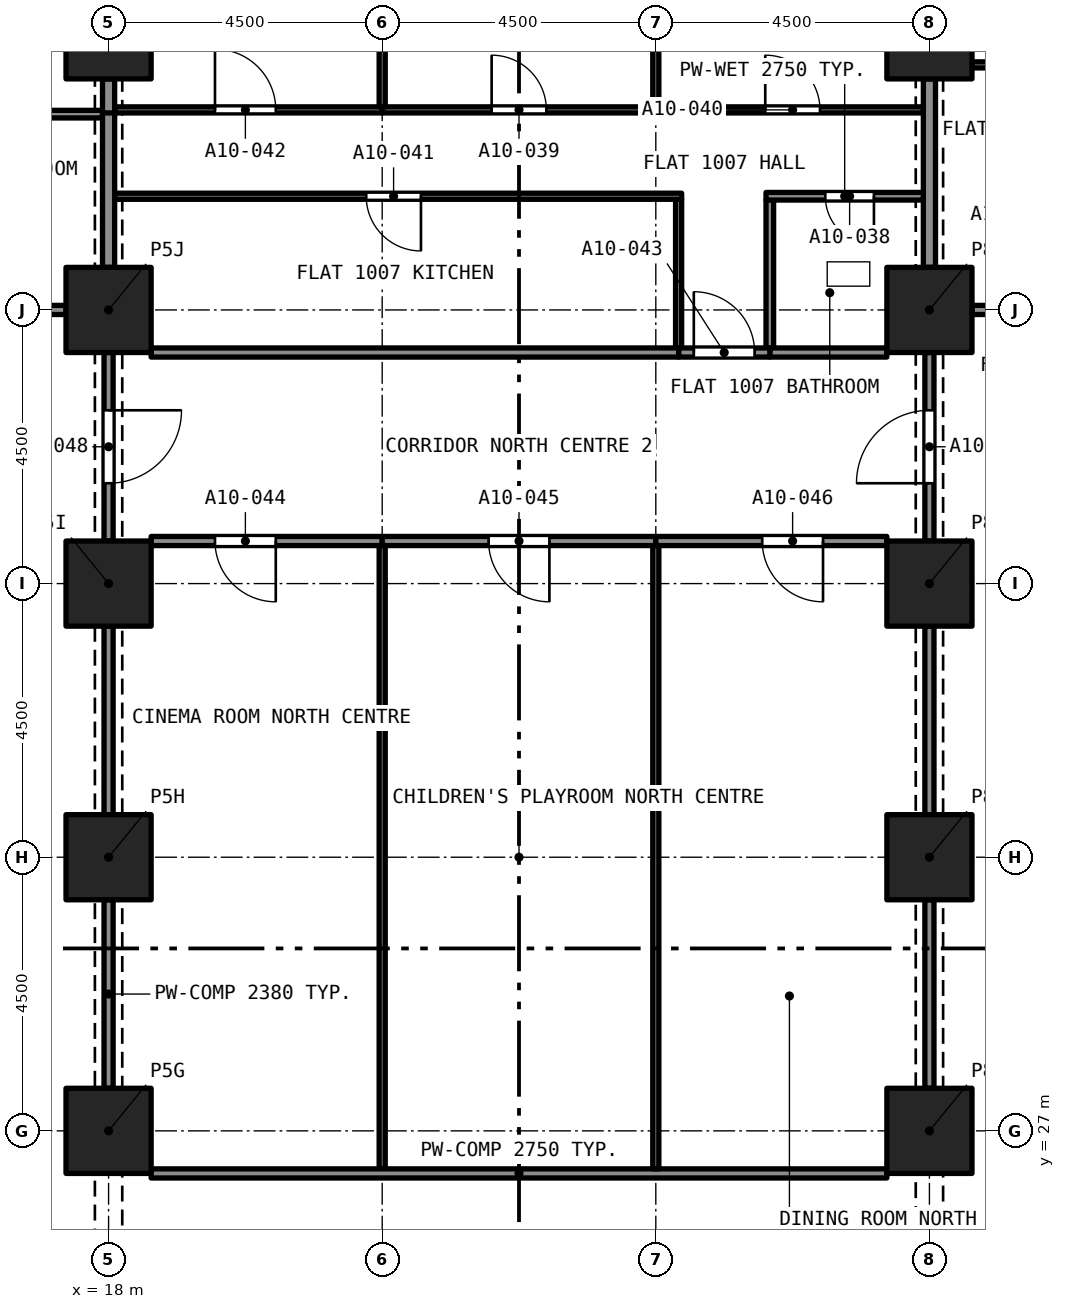
"""IFC4 building model, lengths in metres.
Left out: names, types, materials, properties, quantities, classifications, styles, units other than length and angle.
Written with IfcOpenShell. Run it as: python <this file> out.ifc"""

import sys

from ifc_helpers import new_model, si_unit, direction, frame, frame_2d, origin, origin_2d, place, context, subcontext, project, spatial, rectangle, extrude, element, fill, save


model = new_model("IFC4")
c1 = context("Model", 3, precision=1e-05, world=origin(), true_north=direction((0.0, 1.0)))
c2 = subcontext(c1, "Body", "Model", "MODEL_VIEW")
j1 = project(units=[si_unit("LENGTHUNIT", "METRE"), si_unit("PLANEANGLEUNIT", "RADIAN")], contexts=[c1])
p1 = place(None, origin())
s1 = spatial("IfcSite", under=j1, at=p1, CompositionType="ELEMENT")
p2 = place(p1, origin())
s2 = spatial("IfcBuilding", under=s1, at=p2, CompositionType="ELEMENT")
p3 = place(p2, frame((0.0, 0.0, 43.2)))
s3 = spatial("IfcBuildingStorey", under=s2, at=p3, CompositionType="ELEMENT", Elevation=43.2)
for number, where, z_axis, x_axis in (
    (1, (18.0, 27.0, 0.0), (0.0, 0.0, 1.0), (1.0, 0.0, 0.0)),
    (2, (31.5, 27.0, 0.0), (0.0, 0.0, 1.0), (1.0, 0.0, 0.0)),
    (3, (18.0, 31.5, 0.0), (0.0, 0.0, 1.0), (1.0, 0.0, 0.0)),
    (4, (31.5, 31.5, 0.0), (0.0, 0.0, 1.0), (1.0, 0.0, 0.0)),
    (5, (18.0, 36.0, 0.0), (0.0, 0.0, 1.0), (1.0, 0.0, 0.0)),
    (6, (31.5, 36.0, 0.0), (0.0, 0.0, 1.0), (1.0, 0.0, 0.0)),
    (7, (18.0, 40.5, 0.0), (0.0, 0.0, 1.0), (1.0, 0.0, 0.0)),
    (8, (31.5, 40.5, 0.0), (0.0, 0.0, 1.0), (1.0, 0.0, 0.0)),
    (9, (18.0, 45.0, 0.0), (0.0, 0.0, 1.0), (1.0, 0.0, 0.0)),
    (10, (31.5, 45.0, 0.0), (0.0, 0.0, 1.0), (1.0, 0.0, 0.0)),
):
    element("IfcColumn", number, at=place(p3, frame(where, z_axis=z_axis, x_axis=x_axis)), inside=s3, PredefinedType="COLUMN", context=c2, shape_type="SweptSolid", body=[
        extrude(rectangle(XDim=1.4, YDim=1.4, at=origin_2d()), origin(), (0.0, 0.0, 1.0), 3.2),
    ])
p4 = place(p3, frame((17.9, 43.72, 0.0), z_axis=(0.0, 0.0, 1.0), x_axis=(-1.0, 0.0, 0.0)))
e11 = element("IfcWall", 11, at=p4, inside=s3, PredefinedType="PARTITIONING", context=c2, shape_type="SweptSolid", body=[
    extrude(rectangle(XDim=4.327, YDim=0.125, at=frame_2d((2.163, 0.0))), origin(), (0.0, 0.0, 1.0), 2.9),
])
p5 = place(p4, frame((1.713, 0.0, 0.0)))
e12 = element("IfcOpeningElement", 12, at=p5, cuts=e11, PredefinedType="OPENING", context=c2, shape_type="SweptSolid", body=[
    extrude(rectangle(XDim=0.8, YDim=2.1, at=frame_2d((0.4, 1.05))), frame((0.0, 0.073, 0.0), z_axis=(0.0, -1.0, 0.0), x_axis=(1.0, 0.0, 0.0)), (0.0, 0.0, 1.0), 0.145),
])
p6 = place(p3, frame((18.0, 41.2, 0.0), z_axis=(0.0, 0.0, 1.0), x_axis=(0.0, 1.0, 0.0)))
e13 = element("IfcWall", 13, at=p6, inside=s3, PredefinedType="PARTITIONING", context=c2, shape_type="SweptSolid", body=[
    extrude(rectangle(XDim=2.583, YDim=0.2, at=frame_2d((1.291, 0.0))), origin(), (0.0, 0.0, 1.0), 2.38),
])
p7 = place(p3, frame((13.511, 40.5, 0.0), z_axis=(0.0, 0.0, 1.0), x_axis=(1.0, 0.0, 0.0)))
e14 = element("IfcWall", 14, at=p7, inside=s3, PredefinedType="PARTITIONING", context=c2, shape_type="SweptSolid", body=[
    extrude(rectangle(XDim=3.789, YDim=0.15, at=frame_2d((1.895, 0.0))), origin(), (0.0, 0.0, 1.0), 2.9),
])
p8 = place(p3, frame((18.0, 43.74, 0.0), z_axis=(0.0, 0.0, 1.0), x_axis=(0.0, 1.0, 0.0)))
e15 = element("IfcWall", 15, at=p8, inside=s3, PredefinedType="PARTITIONING", context=c2, shape_type="SweptSolid", body=[
    extrude(rectangle(XDim=0.56, YDim=0.2, at=frame_2d((0.28, 0.0))), origin(), (0.0, 0.0, 1.0), 2.38),
])
p9 = place(p3, frame((32.2, 44.53, 0.0), z_axis=(0.0, 0.0, 1.0), x_axis=(1.0, 0.0, 0.0)))
e16 = element("IfcWall", 16, at=p9, inside=s3, PredefinedType="PARTITIONING", context=c2, shape_type="SweptSolid", body=[
    extrude(rectangle(XDim=3.8, YDim=0.1, at=frame_2d((1.9, 0.0))), origin(), (0.0, 0.0, 1.0), 2.9),
])
p10 = place(p9, frame((1.05, 0.0, 0.0)))
e17 = element("IfcOpeningElement", 17, at=p10, cuts=e16, PredefinedType="OPENING", context=c2, shape_type="SweptSolid", body=[
    extrude(rectangle(XDim=1.0, YDim=2.1, at=frame_2d((0.5, 1.05))), frame((0.0, 0.06, 0.0), z_axis=(0.0, -1.0, 0.0), x_axis=(1.0, 0.0, 0.0)), (0.0, 0.0, 1.0), 0.12),
])
p11 = place(p3, frame((31.5, 41.2, 0.0), z_axis=(0.0, 0.0, 1.0), x_axis=(0.0, 1.0, 0.0)))
e18 = element("IfcWall", 18, at=p11, inside=s3, PredefinedType="PARTITIONING", context=c2, shape_type="SweptSolid", body=[
    extrude(rectangle(XDim=3.1, YDim=0.2, at=frame_2d((1.55, 0.0))), origin(), (0.0, 0.0, 1.0), 2.38),
])
p12 = place(p3, frame((32.2, 40.5, 0.0), z_axis=(0.0, 0.0, 1.0), x_axis=(1.0, 0.0, 0.0)))
e19 = element("IfcWall", 19, at=p12, inside=s3, PredefinedType="PARTITIONING", context=c2, shape_type="SweptSolid", body=[
    extrude(rectangle(XDim=2.3, YDim=0.15, at=frame_2d((1.15, 0.0))), origin(), (0.0, 0.0, 1.0), 2.9),
])
p13 = place(p12, frame((1.05, 0.0, 0.0)))
e20 = element("IfcOpeningElement", 20, at=p13, cuts=e19, PredefinedType="OPENING", context=c2, shape_type="SweptSolid", body=[
    extrude(rectangle(XDim=1.0, YDim=2.1, at=frame_2d((0.5, 1.05))), frame((0.0, 0.085, 0.0), z_axis=(0.0, -1.0, 0.0), x_axis=(1.0, 0.0, 0.0)), (0.0, 0.0, 1.0), 0.17),
])
p14 = place(p3, frame((28.875, 39.875, 0.0), z_axis=(0.0, 0.0, 1.0), x_axis=(0.0, 1.0, 0.0)))
e21 = element("IfcWall", 21, at=p14, inside=s3, PredefinedType="PARTITIONING", context=c2, shape_type="SweptSolid", body=[
    extrude(rectangle(XDim=2.433, YDim=0.125, at=frame_2d((1.216, 0.0))), origin(), (0.0, 0.0, 1.0), 2.75),
])
p15 = place(p3, frame((31.4, 42.37, 0.0), z_axis=(0.0, 0.0, 1.0), x_axis=(-1.0, 0.0, 0.0)))
e22 = element("IfcWall", 22, at=p15, inside=s3, PredefinedType="PARTITIONING", context=c2, shape_type="SweptSolid", body=[
    extrude(rectangle(XDim=2.587, YDim=0.125, at=frame_2d((1.294, 0.0))), origin(), (0.0, 0.0, 1.0), 2.75),
])
p16 = place(p15, frame((0.812, 0.0, 0.0)))
e23 = element("IfcOpeningElement", 23, at=p16, cuts=e22, PredefinedType="OPENING", context=c2, shape_type="SweptSolid", body=[
    extrude(rectangle(XDim=0.8, YDim=2.1, at=frame_2d((0.4, 1.05))), frame((0.0, 0.073, 0.0), z_axis=(0.0, -1.0, 0.0), x_axis=(1.0, 0.0, 0.0)), (0.0, 0.0, 1.0), 0.145),
])
p17 = place(p3, frame((28.875, 39.8, 0.0), z_axis=(0.0, 0.0, 1.0), x_axis=(1.0, 0.0, 0.0)))
e24 = element("IfcWall", 24, at=p17, inside=s3, PredefinedType="PARTITIONING", context=c2, shape_type="SweptSolid", body=[
    extrude(rectangle(XDim=1.925, YDim=0.15, at=frame_2d((0.962, 0.0))), origin(), (0.0, 0.0, 1.0), 2.75),
])
p18 = place(p3, frame((27.0, 43.84, 0.0), z_axis=(0.0, 0.0, 1.0), x_axis=(0.0, 1.0, 0.0)))
e25 = element("IfcWall", 25, at=p18, inside=s3, PredefinedType="PARTITIONING", context=c2, shape_type="SweptSolid", body=[
    extrude(rectangle(XDim=4.96, YDim=0.1, at=frame_2d((2.48, 0.0))), origin(), (0.0, 0.0, 1.0), 2.75),
])
p19 = place(p3, frame((22.5, 43.79, 0.0), z_axis=(0.0, 0.0, 1.0), x_axis=(1.0, 0.0, 0.0)))
e26 = element("IfcWall", 26, at=p19, inside=s3, PredefinedType="PARTITIONING", context=c2, shape_type="SweptSolid", body=[
    extrude(rectangle(XDim=4.5, YDim=0.1, at=frame_2d((2.25, 0.0))), origin(), (0.0, 0.0, 1.0), 2.75),
])
p20 = place(p19, frame((1.8, 0.0, 0.0)))
e27 = element("IfcOpeningElement", 27, at=p20, cuts=e26, PredefinedType="OPENING", context=c2, shape_type="SweptSolid", body=[
    extrude(rectangle(XDim=0.9, YDim=2.1, at=frame_2d((0.45, 1.05))), frame((0.0, 0.06, 0.0), z_axis=(0.0, -1.0, 0.0), x_axis=(1.0, 0.0, 0.0)), (0.0, 0.0, 1.0), 0.12),
])
p21 = place(p3, frame((22.5, 43.84, 0.0), z_axis=(0.0, 0.0, 1.0), x_axis=(0.0, 1.0, 0.0)))
e28 = element("IfcWall", 28, at=p21, inside=s3, PredefinedType="PARTITIONING", context=c2, shape_type="SweptSolid", body=[
    extrude(rectangle(XDim=4.96, YDim=0.1, at=frame_2d((2.48, 0.0))), origin(), (0.0, 0.0, 1.0), 2.75),
])
p22 = place(p3, frame((27.0, 43.79, 0.0), z_axis=(0.0, 0.0, 1.0), x_axis=(1.0, 0.0, 0.0)))
e29 = element("IfcWall", 29, at=p22, inside=s3, PredefinedType="PARTITIONING", context=c2, shape_type="SweptSolid", body=[
    extrude(rectangle(XDim=4.4, YDim=0.1, at=frame_2d((2.2, 0.0))), origin(), (0.0, 0.0, 1.0), 2.75),
])
p23 = place(p22, frame((1.8, 0.0, 0.0)))
e30 = element("IfcOpeningElement", 30, at=p23, cuts=e29, PredefinedType="OPENING", context=c2, shape_type="SweptSolid", body=[
    extrude(rectangle(XDim=0.9, YDim=2.1, at=frame_2d((0.45, 1.05))), frame((0.0, 0.06, 0.0), z_axis=(0.0, -1.0, 0.0), x_axis=(1.0, 0.0, 0.0)), (0.0, 0.0, 1.0), 0.12),
])
p24 = place(p3, frame((27.375, 39.875, 0.0), z_axis=(0.0, 0.0, 1.0), x_axis=(0.0, 1.0, 0.0)))
e31 = element("IfcWall", 31, at=p24, inside=s3, PredefinedType="PARTITIONING", context=c2, shape_type="SweptSolid", body=[
    extrude(rectangle(XDim=2.445, YDim=0.1, at=frame_2d((1.223, 0.0))), origin(), (0.0, 0.0, 1.0), 2.75),
])
p25 = place(p3, frame((27.425, 42.37, 0.0), z_axis=(0.0, 0.0, 1.0), x_axis=(-1.0, 0.0, 0.0)))
e32 = element("IfcWall", 32, at=p25, inside=s3, PredefinedType="PARTITIONING", context=c2, shape_type="SweptSolid", body=[
    extrude(rectangle(XDim=9.325, YDim=0.1, at=frame_2d((4.663, 0.0))), origin(), (0.0, 0.0, 1.0), 2.75),
])
p26 = place(p25, frame((4.288, 0.0, 0.0)))
e33 = element("IfcOpeningElement", 33, at=p26, cuts=e32, PredefinedType="OPENING", context=c2, shape_type="SweptSolid", body=[
    extrude(rectangle(XDim=0.9, YDim=2.1, at=frame_2d((0.45, 1.05))), frame((0.0, 0.06, 0.0), z_axis=(0.0, -1.0, 0.0), x_axis=(1.0, 0.0, 0.0)), (0.0, 0.0, 1.0), 0.12),
])
p27 = place(p3, frame((18.1, 43.79, 0.0), z_axis=(0.0, 0.0, 1.0), x_axis=(1.0, 0.0, 0.0)))
e34 = element("IfcWall", 34, at=p27, inside=s3, PredefinedType="PARTITIONING", context=c2, shape_type="SweptSolid", body=[
    extrude(rectangle(XDim=4.4, YDim=0.1, at=frame_2d((2.2, 0.0))), origin(), (0.0, 0.0, 1.0), 2.75),
])
p28 = place(p27, frame((1.65, 0.0, 0.0)))
e35 = element("IfcOpeningElement", 35, at=p28, cuts=e34, PredefinedType="OPENING", context=c2, shape_type="SweptSolid", body=[
    extrude(rectangle(XDim=1.0, YDim=2.1, at=frame_2d((0.5, 1.05))), frame((0.0, 0.06, 0.0), z_axis=(0.0, -1.0, 0.0), x_axis=(1.0, 0.0, 0.0)), (0.0, 0.0, 1.0), 0.12),
])
p29 = place(p3, frame((27.375, 39.8, 0.0), z_axis=(0.0, 0.0, 1.0), x_axis=(1.0, 0.0, 0.0)))
e36 = element("IfcWall", 36, at=p29, inside=s3, PredefinedType="PARTITIONING", context=c2, shape_type="SweptSolid", body=[
    extrude(rectangle(XDim=1.5, YDim=0.15, at=frame_2d((0.75, 0.0))), origin(), (0.0, 0.0, 1.0), 2.75),
])
p30 = place(p29, frame((0.25, 0.0, 0.0)))
e37 = element("IfcOpeningElement", 37, at=p30, cuts=e36, PredefinedType="OPENING", context=c2, shape_type="SweptSolid", body=[
    extrude(rectangle(XDim=1.0, YDim=2.1, at=frame_2d((0.5, 1.05))), frame((0.0, 0.085, 0.0), z_axis=(0.0, -1.0, 0.0), x_axis=(1.0, 0.0, 0.0)), (0.0, 0.0, 1.0), 0.17),
])
p31 = place(p3, frame((18.7, 39.8, 0.0), z_axis=(0.0, 0.0, 1.0), x_axis=(1.0, 0.0, 0.0)))
e38 = element("IfcWall", 38, at=p31, inside=s3, PredefinedType="PARTITIONING", context=c2, shape_type="SweptSolid", body=[
    extrude(rectangle(XDim=8.675, YDim=0.15, at=frame_2d((4.337, 0.0))), origin(), (0.0, 0.0, 1.0), 2.75),
])
p32 = place(p3, frame((22.5, 36.7, 0.0), z_axis=(0.0, 0.0, 1.0), x_axis=(-1.0, 0.0, 0.0)))
e39 = element("IfcWall", 39, at=p32, inside=s3, PredefinedType="PARTITIONING", context=c2, shape_type="SweptSolid", body=[
    extrude(rectangle(XDim=3.8, YDim=0.15, at=frame_2d((1.9, 0.0))), origin(), (0.0, 0.0, 1.0), 2.75),
])
p33 = place(p32, frame((1.75, 0.0, 0.0)))
e40 = element("IfcOpeningElement", 40, at=p33, cuts=e39, PredefinedType="OPENING", context=c2, shape_type="SweptSolid", body=[
    extrude(rectangle(XDim=1.0, YDim=2.1, at=frame_2d((0.5, 1.05))), frame((0.0, 0.085, 0.0), z_axis=(0.0, -1.0, 0.0), x_axis=(1.0, 0.0, 0.0)), (0.0, 0.0, 1.0), 0.17),
])
p34 = place(p3, frame((27.0, 36.7, 0.0), z_axis=(0.0, 0.0, 1.0), x_axis=(-1.0, 0.0, 0.0)))
e41 = element("IfcWall", 41, at=p34, inside=s3, PredefinedType="PARTITIONING", context=c2, shape_type="SweptSolid", body=[
    extrude(rectangle(XDim=4.5, YDim=0.15, at=frame_2d((2.25, 0.0))), origin(), (0.0, 0.0, 1.0), 2.75),
])
p35 = place(p34, frame((1.75, 0.0, 0.0)))
e42 = element("IfcOpeningElement", 42, at=p35, cuts=e41, PredefinedType="OPENING", context=c2, shape_type="SweptSolid", body=[
    extrude(rectangle(XDim=1.0, YDim=2.1, at=frame_2d((0.5, 1.05))), frame((0.0, 0.085, 0.0), z_axis=(0.0, -1.0, 0.0), x_axis=(1.0, 0.0, 0.0)), (0.0, 0.0, 1.0), 0.17),
])
p36 = place(p3, frame((30.8, 36.7, 0.0), z_axis=(0.0, 0.0, 1.0), x_axis=(-1.0, 0.0, 0.0)))
e43 = element("IfcWall", 43, at=p36, inside=s3, PredefinedType="PARTITIONING", context=c2, shape_type="SweptSolid", body=[
    extrude(rectangle(XDim=3.8, YDim=0.15, at=frame_2d((1.9, 0.0))), origin(), (0.0, 0.0, 1.0), 2.75),
])
p37 = place(p36, frame((1.05, 0.0, 0.0)))
e44 = element("IfcOpeningElement", 44, at=p37, cuts=e43, PredefinedType="OPENING", context=c2, shape_type="SweptSolid", body=[
    extrude(rectangle(XDim=1.0, YDim=2.1, at=frame_2d((0.5, 1.05))), frame((0.0, 0.085, 0.0), z_axis=(0.0, -1.0, 0.0), x_axis=(1.0, 0.0, 0.0)), (0.0, 0.0, 1.0), 0.17),
])
p38 = place(p3, frame((31.5, 36.7, 0.0), z_axis=(0.0, 0.0, 1.0), x_axis=(0.0, 1.0, 0.0)))
e45 = element("IfcWall", 45, at=p38, inside=s3, PredefinedType="PARTITIONING", context=c2, shape_type="SweptSolid", body=[
    extrude(rectangle(XDim=3.1, YDim=0.15, at=frame_2d((1.55, 0.0))), origin(), (0.0, 0.0, 1.0), 2.38),
])
p39 = place(p38, frame((0.95, 0.0, 0.0)))
e46 = element("IfcOpeningElement", 46, at=p39, cuts=e45, PredefinedType="OPENING", context=c2, shape_type="SweptSolid", body=[
    extrude(rectangle(XDim=1.2, YDim=2.1, at=frame_2d((0.6, 1.05))), frame((0.0, 0.085, 0.0), z_axis=(0.0, -1.0, 0.0), x_axis=(1.0, 0.0, 0.0)), (0.0, 0.0, 1.0), 0.17),
])
p40 = place(p3, frame((18.0, 39.8, 0.0), z_axis=(0.0, 0.0, 1.0), x_axis=(0.0, -1.0, 0.0)))
e47 = element("IfcWall", 47, at=p40, inside=s3, PredefinedType="PARTITIONING", context=c2, shape_type="SweptSolid", body=[
    extrude(rectangle(XDim=3.1, YDim=0.15, at=frame_2d((1.55, 0.0))), origin(), (0.0, 0.0, 1.0), 2.38),
])
p41 = place(p40, frame((0.95, 0.0, 0.0)))
e48 = element("IfcOpeningElement", 48, at=p41, cuts=e47, PredefinedType="OPENING", context=c2, shape_type="SweptSolid", body=[
    extrude(rectangle(XDim=1.2, YDim=2.1, at=frame_2d((0.6, 1.05))), frame((0.0, 0.085, 0.0), z_axis=(0.0, -1.0, 0.0), x_axis=(1.0, 0.0, 0.0)), (0.0, 0.0, 1.0), 0.17),
])
p42 = place(p3, frame((22.5, 26.375, 0.0), z_axis=(0.0, 0.0, 1.0), x_axis=(0.0, 1.0, 0.0)))
e49 = element("IfcWall", 49, at=p42, inside=s3, PredefinedType="PARTITIONING", context=c2, shape_type="SweptSolid", body=[
    extrude(rectangle(XDim=10.25, YDim=0.1, at=frame_2d((5.125, 0.0))), origin(), (0.0, 0.0, 1.0), 2.75),
])
for number, where, z_axis, x_axis in (
    (50, (18.0, 27.7, 0.0), (0.0, 0.0, 1.0), (0.0, 1.0, 0.0)),
    (51, (18.0, 32.2, 0.0), (0.0, 0.0, 1.0), (0.0, 1.0, 0.0)),
):
    element("IfcWall", number, at=place(p3, frame(where, z_axis=z_axis, x_axis=x_axis)), inside=s3, PredefinedType="PARTITIONING", context=c2, shape_type="SweptSolid", body=[
        extrude(rectangle(XDim=3.1, YDim=0.15, at=frame_2d((1.55, 0.0))), origin(), (0.0, 0.0, 1.0), 2.38),
    ])
p43 = place(p3, frame((18.7, 26.3, 0.0), z_axis=(0.0, 0.0, 1.0), x_axis=(1.0, 0.0, 0.0)))
e52 = element("IfcWall", 52, at=p43, inside=s3, PredefinedType="PARTITIONING", context=c2, shape_type="SweptSolid", body=[
    extrude(rectangle(XDim=12.1, YDim=0.15, at=frame_2d((6.05, 0.0))), origin(), (0.0, 0.0, 1.0), 2.75),
])
p44 = place(p3, frame((27.0, 26.375, 0.0), z_axis=(0.0, 0.0, 1.0), x_axis=(0.0, 1.0, 0.0)))
e53 = element("IfcWall", 53, at=p44, inside=s3, PredefinedType="PARTITIONING", context=c2, shape_type="SweptSolid", body=[
    extrude(rectangle(XDim=10.25, YDim=0.1, at=frame_2d((5.125, 0.0))), origin(), (0.0, 0.0, 1.0), 2.75),
])
for number, where, z_axis, x_axis in (
    (54, (31.5, 32.2, 0.0), (0.0, 0.0, 1.0), (0.0, 1.0, 0.0)),
    (55, (31.5, 27.7, 0.0), (0.0, 0.0, 1.0), (0.0, 1.0, 0.0)),
):
    element("IfcWall", number, at=place(p3, frame(where, z_axis=z_axis, x_axis=x_axis)), inside=s3, PredefinedType="PARTITIONING", context=c2, shape_type="SweptSolid", body=[
        extrude(rectangle(XDim=3.1, YDim=0.15, at=frame_2d((1.55, 0.0))), origin(), (0.0, 0.0, 1.0), 2.38),
    ])
p45 = place(p16, origin())
e56 = element("IfcDoor", 56, at=p45, inside=s3, OperationType="SINGLE_SWING_LEFT", PredefinedType="DOOR", context=c2, shape_type="SweptSolid", body=[
    extrude(rectangle(XDim=0.8, YDim=2.1, at=frame_2d((0.4, 1.05))), frame((0.0, 0.025, 0.0), z_axis=(0.0, -1.0, 0.0), x_axis=(1.0, 0.0, 0.0)), (0.0, 0.0, 1.0), 0.05),
])
fill(e23, e56)
p46 = place(p20, origin())
e57 = element("IfcDoor", 57, at=p46, inside=s3, OperationType="SINGLE_SWING_LEFT", PredefinedType="DOOR", context=c2, shape_type="SweptSolid", body=[
    extrude(rectangle(XDim=0.9, YDim=2.1, at=frame_2d((0.45, 1.05))), frame((0.0, 0.025, 0.0), z_axis=(0.0, -1.0, 0.0), x_axis=(1.0, 0.0, 0.0)), (0.0, 0.0, 1.0), 0.05),
])
fill(e27, e57)
p47 = place(p23, origin())
e58 = element("IfcDoor", 58, at=p47, inside=s3, OperationType="SINGLE_SWING_RIGHT", PredefinedType="DOOR", context=c2, shape_type="SweptSolid", body=[
    extrude(rectangle(XDim=0.9, YDim=2.1, at=frame_2d((0.45, 1.05))), frame((0.0, 0.025, 0.0), z_axis=(0.0, -1.0, 0.0), x_axis=(1.0, 0.0, 0.0)), (0.0, 0.0, 1.0), 0.05),
])
fill(e30, e58)
p48 = place(p26, origin())
e59 = element("IfcDoor", 59, at=p48, inside=s3, OperationType="SINGLE_SWING_RIGHT", PredefinedType="DOOR", context=c2, shape_type="SweptSolid", body=[
    extrude(rectangle(XDim=0.9, YDim=2.1, at=frame_2d((0.45, 1.05))), frame((0.0, 0.025, 0.0), z_axis=(0.0, -1.0, 0.0), x_axis=(1.0, 0.0, 0.0)), (0.0, 0.0, 1.0), 0.05),
])
fill(e33, e59)
p49 = place(p28, origin())
e60 = element("IfcDoor", 60, at=p49, inside=s3, OperationType="SINGLE_SWING_LEFT", PredefinedType="DOOR", context=c2, shape_type="SweptSolid", body=[
    extrude(rectangle(XDim=1.0, YDim=2.1, at=frame_2d((0.5, 1.05))), frame((0.0, 0.025, 0.0), z_axis=(0.0, -1.0, 0.0), x_axis=(1.0, 0.0, 0.0)), (0.0, 0.0, 1.0), 0.05),
])
fill(e35, e60)
p50 = place(p30, origin())
e61 = element("IfcDoor", 61, at=p50, inside=s3, OperationType="SINGLE_SWING_RIGHT", PredefinedType="DOOR", context=c2, shape_type="SweptSolid", body=[
    extrude(rectangle(XDim=1.0, YDim=2.1, at=frame_2d((0.5, 1.05))), frame((0.0, 0.025, 0.0), z_axis=(0.0, -1.0, 0.0), x_axis=(1.0, 0.0, 0.0)), (0.0, 0.0, 1.0), 0.05),
])
fill(e37, e61)
p51 = place(p33, origin())
e62 = element("IfcDoor", 62, at=p51, inside=s3, OperationType="SINGLE_SWING_RIGHT", PredefinedType="DOOR", context=c2, shape_type="SweptSolid", body=[
    extrude(rectangle(XDim=1.0, YDim=2.1, at=frame_2d((0.5, 1.05))), frame((0.0, 0.025, 0.0), z_axis=(0.0, -1.0, 0.0), x_axis=(1.0, 0.0, 0.0)), (0.0, 0.0, 1.0), 0.05),
])
fill(e40, e62)
p52 = place(p35, origin())
e63 = element("IfcDoor", 63, at=p52, inside=s3, OperationType="SINGLE_SWING_RIGHT", PredefinedType="DOOR", context=c2, shape_type="SweptSolid", body=[
    extrude(rectangle(XDim=1.0, YDim=2.1, at=frame_2d((0.5, 1.05))), frame((0.0, 0.025, 0.0), z_axis=(0.0, -1.0, 0.0), x_axis=(1.0, 0.0, 0.0)), (0.0, 0.0, 1.0), 0.05),
])
fill(e42, e63)
p53 = place(p37, origin())
e64 = element("IfcDoor", 64, at=p53, inside=s3, OperationType="SINGLE_SWING_LEFT", PredefinedType="DOOR", context=c2, shape_type="SweptSolid", body=[
    extrude(rectangle(XDim=1.0, YDim=2.1, at=frame_2d((0.5, 1.05))), frame((0.0, 0.025, 0.0), z_axis=(0.0, -1.0, 0.0), x_axis=(1.0, 0.0, 0.0)), (0.0, 0.0, 1.0), 0.05),
])
fill(e44, e64)
p54 = place(p39, origin())
e65 = element("IfcDoor", 65, at=p54, inside=s3, OperationType="SINGLE_SWING_LEFT", PredefinedType="DOOR", context=c2, shape_type="SweptSolid", body=[
    extrude(rectangle(XDim=1.2, YDim=2.1, at=frame_2d((0.6, 1.05))), frame((0.0, 0.025, 0.0), z_axis=(0.0, -1.0, 0.0), x_axis=(1.0, 0.0, 0.0)), (0.0, 0.0, 1.0), 0.05),
])
fill(e46, e65)
p55 = place(p41, origin())
e66 = element("IfcDoor", 66, at=p55, inside=s3, OperationType="SINGLE_SWING_LEFT", PredefinedType="DOOR", context=c2, shape_type="SweptSolid", body=[
    extrude(rectangle(XDim=1.2, YDim=2.1, at=frame_2d((0.6, 1.05))), frame((0.0, 0.025, 0.0), z_axis=(0.0, -1.0, 0.0), x_axis=(1.0, 0.0, 0.0)), (0.0, 0.0, 1.0), 0.05),
])
fill(e48, e66)
save(model, sys.argv[1])
